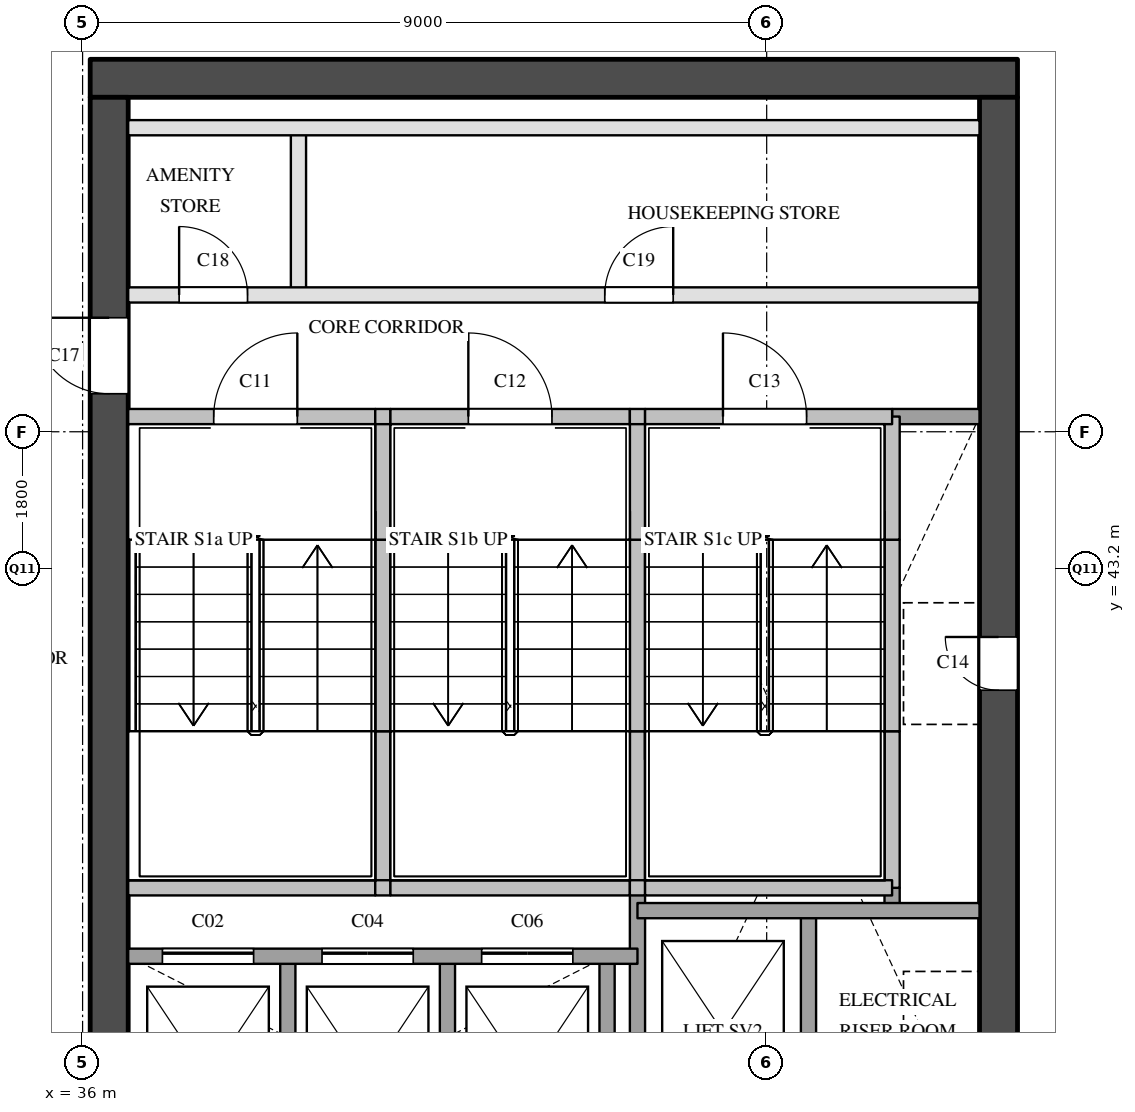
"""IFC4 building model, lengths in metres.
Left out: names, types, materials, properties, quantities, classifications, styles, units other than length and angle.
Written with IfcOpenShell. Run it as: python <this file> out.ifc"""

import sys

from ifc_helpers import new_model, si_unit, direction, frame, frame_2d, origin, place, context, subcontext, project, spatial, rectangle, extrude, element, fill, save


model = new_model("IFC4")
c1 = context("Model", 3, precision=1e-05, world=origin(), true_north=direction((0.0, 1.0)))
c2 = subcontext(c1, "Body", "Model", "MODEL_VIEW")
j1 = project(units=[si_unit("LENGTHUNIT", "METRE"), si_unit("PLANEANGLEUNIT", "RADIAN")], contexts=[c1])
p1 = place(None, origin())
s1 = spatial("IfcSite", under=j1, at=p1, CompositionType="ELEMENT")
p2 = place(p1, origin())
s2 = spatial("IfcBuilding", under=s1, at=p2, CompositionType="ELEMENT")
p3 = place(p2, frame((0.0, 0.0, 129.4)))
s3 = spatial("IfcBuildingStorey", under=s2, at=p3, CompositionType="ELEMENT", Elevation=129.4)
p4 = place(p3, frame((36.1, 49.65, 0.0), z_axis=(0.0, 0.0, 1.0), x_axis=(1.0, 0.0, 0.0)))
e1 = element("IfcWall", 1, at=p4, inside=s3, PredefinedType="SHEAR", context=c2, shape_type="SweptSolid", body=[
    extrude(rectangle(XDim=12.2, YDim=0.5, at=frame_2d((6.1, 0.0))), origin(), (0.0, 0.0, 1.0), 5.2),
])
p5 = place(p3, frame((36.35, 29.1, 0.0), z_axis=(0.0, 0.0, 1.0), x_axis=(0.0, 1.0, 0.0)))
e2 = element("IfcWall", 2, at=p5, inside=s3, PredefinedType="SHEAR", context=c2, shape_type="SweptSolid", body=[
    extrude(rectangle(XDim=20.3, YDim=0.5, at=frame_2d((10.15, 0.0))), origin(), (0.0, 0.0, 1.0), 5.2),
])
p6 = place(p5, frame((3.6, 0.0, 0.0)))
e3 = element("IfcOpeningElement", 3, at=p6, cuts=e2, PredefinedType="OPENING", context=c2, shape_type="SweptSolid", body=[
    extrude(rectangle(XDim=1.8, YDim=2.1, at=frame_2d((0.9, 1.05))), frame((0.0, 0.26, 0.0), z_axis=(0.0, -1.0, 0.0), x_axis=(1.0, 0.0, 0.0)), (0.0, 0.0, 1.0), 0.52),
])
p7 = place(p5, frame((16.4, 0.0, 0.0)))
e4 = element("IfcOpeningElement", 4, at=p7, cuts=e2, PredefinedType="OPENING", context=c2, shape_type="SweptSolid", body=[
    extrude(rectangle(XDim=1.0, YDim=2.1, at=frame_2d((0.5, 1.05))), frame((0.0, 0.26, 0.0), z_axis=(0.0, -1.0, 0.0), x_axis=(1.0, 0.0, 0.0)), (0.0, 0.0, 1.0), 0.52),
])
p8 = place(p3, frame((48.05, 29.1, 0.0), z_axis=(0.0, 0.0, 1.0), x_axis=(0.0, 1.0, 0.0)))
e5 = element("IfcWall", 5, at=p8, inside=s3, PredefinedType="SHEAR", context=c2, shape_type="SweptSolid", body=[
    extrude(rectangle(XDim=20.3, YDim=0.5, at=frame_2d((10.15, 0.0))), origin(), (0.0, 0.0, 1.0), 5.2),
])
p9 = place(p8, frame((12.5, 0.0, 0.0)))
e6 = element("IfcOpeningElement", 6, at=p9, cuts=e5, PredefinedType="OPENING", context=c2, shape_type="SweptSolid", body=[
    extrude(rectangle(XDim=0.7, YDim=2.1, at=frame_2d((0.35, 1.05))), frame((0.0, 0.26, 0.0), z_axis=(0.0, -1.0, 0.0), x_axis=(1.0, 0.0, 0.0)), (0.0, 0.0, 1.0), 0.52),
])
p10 = place(p8, frame((3.9, 0.0, 0.0)))
e7 = element("IfcOpeningElement", 7, at=p10, cuts=e5, PredefinedType="OPENING", context=c2, shape_type="SweptSolid", body=[
    extrude(rectangle(XDim=1.8, YDim=2.1, at=frame_2d((0.9, 1.05))), frame((0.0, 0.26, 0.0), z_axis=(0.0, -1.0, 0.0), x_axis=(1.0, 0.0, 0.0)), (0.0, 0.0, 1.0), 0.52),
])
p11 = place(p3, frame((38.7, 34.9, 0.0), z_axis=(0.0, 0.0, 1.0), x_axis=(0.0, 1.0, 0.0)))
e8 = element("IfcWall", 8, at=p11, inside=s3, PredefinedType="SOLIDWALL", context=c2, shape_type="SweptSolid", body=[
    extrude(rectangle(XDim=3.2, YDim=0.2, at=frame_2d((1.6, 0.0))), origin(), (0.0, 0.0, 1.0), 5.2),
])
p12 = place(p3, frame((38.84, 46.8, 0.0), z_axis=(0.0, 0.0, 1.0), x_axis=(0.0, 1.0, 0.0)))
e9 = element("IfcWall", 9, at=p12, inside=s3, PredefinedType="PARTITIONING", context=c2, shape_type="SweptSolid", body=[
    extrude(rectangle(XDim=2.2, YDim=0.2, at=frame_2d((1.1, 0.0))), origin(), (0.0, 0.0, 1.0), 5.2),
])
p13 = place(p3, frame((39.95, 39.0, 0.0), z_axis=(0.0, 0.0, 1.0), x_axis=(0.0, 1.0, 0.0)))
e10 = element("IfcWall", 10, at=p13, inside=s3, PredefinedType="SOLIDWALL", context=c2, shape_type="SweptSolid", body=[
    extrude(rectangle(XDim=2.06, YDim=0.2, at=frame_2d((1.03, 0.0))), origin(), (0.0, 0.0, 1.0), 5.2),
])
p14 = place(p3, frame((39.95, 41.06, 0.0), z_axis=(0.0, 0.0, 1.0), x_axis=(0.0, 1.0, 0.0)))
e11 = element("IfcWall", 11, at=p14, inside=s3, PredefinedType="SOLIDWALL", context=c2, shape_type="SweptSolid", body=[
    extrude(rectangle(XDim=2.52, YDim=0.2, at=frame_2d((1.26, 0.0))), origin(), (0.0, 0.0, 1.0), 5.2),
])
p15 = place(p3, frame((39.95, 43.58, 0.0), z_axis=(0.0, 0.0, 1.0), x_axis=(0.0, 1.0, 0.0)))
e12 = element("IfcWall", 12, at=p15, inside=s3, PredefinedType="SOLIDWALL", context=c2, shape_type="SweptSolid", body=[
    extrude(rectangle(XDim=1.62, YDim=0.2, at=frame_2d((0.81, 0.0))), origin(), (0.0, 0.0, 1.0), 5.2),
])
for number, where, z_axis, x_axis in (
    (13, (40.8, 34.9, 0.0), (0.0, 0.0, 1.0), (0.0, 1.0, 0.0)),
    (14, (42.9, 34.9, 0.0), (0.0, 0.0, 1.0), (0.0, 1.0, 0.0)),
):
    element("IfcWall", number, at=place(p3, frame(where, z_axis=z_axis, x_axis=x_axis)), inside=s3, PredefinedType="SOLIDWALL", context=c2, shape_type="SweptSolid", body=[
        extrude(rectangle(XDim=3.2, YDim=0.2, at=frame_2d((1.6, 0.0))), origin(), (0.0, 0.0, 1.0), 5.2),
    ])
p16 = place(p3, frame((43.3, 29.1, 0.0), z_axis=(0.0, 0.0, 1.0), x_axis=(0.0, 1.0, 0.0)))
e15 = element("IfcWall", 15, at=p16, inside=s3, PredefinedType="SOLIDWALL", context=c2, shape_type="SweptSolid", body=[
    extrude(rectangle(XDim=9.9, YDim=0.2, at=frame_2d((4.95, 0.0))), origin(), (0.0, 0.0, 1.0), 5.2),
])
p17 = place(p3, frame((43.3, 39.0, 0.0), z_axis=(0.0, 0.0, 1.0), x_axis=(0.0, 1.0, 0.0)))
e16 = element("IfcWall", 16, at=p17, inside=s3, PredefinedType="SOLIDWALL", context=c2, shape_type="SweptSolid", body=[
    extrude(rectangle(XDim=2.06, YDim=0.2, at=frame_2d((1.03, 0.0))), origin(), (0.0, 0.0, 1.0), 5.2),
])
p18 = place(p3, frame((43.3, 41.06, 0.0), z_axis=(0.0, 0.0, 1.0), x_axis=(0.0, 1.0, 0.0)))
e17 = element("IfcWall", 17, at=p18, inside=s3, PredefinedType="SOLIDWALL", context=c2, shape_type="SweptSolid", body=[
    extrude(rectangle(XDim=2.52, YDim=0.2, at=frame_2d((1.26, 0.0))), origin(), (0.0, 0.0, 1.0), 5.2),
])
p19 = place(p3, frame((43.3, 43.58, 0.0), z_axis=(0.0, 0.0, 1.0), x_axis=(0.0, 1.0, 0.0)))
e18 = element("IfcWall", 18, at=p19, inside=s3, PredefinedType="SOLIDWALL", context=c2, shape_type="SweptSolid", body=[
    extrude(rectangle(XDim=1.62, YDim=0.2, at=frame_2d((0.81, 0.0))), origin(), (0.0, 0.0, 1.0), 5.2),
])
p20 = place(p3, frame((45.55, 35.5, 0.0), z_axis=(0.0, 0.0, 1.0), x_axis=(0.0, 1.0, 0.0)))
e19 = element("IfcWall", 19, at=p20, inside=s3, PredefinedType="SOLIDWALL", context=c2, shape_type="SweptSolid", body=[
    extrude(rectangle(XDim=3.2, YDim=0.2, at=frame_2d((1.6, 0.0))), origin(), (0.0, 0.0, 1.0), 5.2),
])
p21 = place(p3, frame((46.65, 38.7, 0.0), z_axis=(0.0, 0.0, 1.0), x_axis=(0.0, 1.0, 0.0)))
e20 = element("IfcWall", 20, at=p21, inside=s3, PredefinedType="SOLIDWALL", context=c2, shape_type="SweptSolid", body=[
    extrude(rectangle(XDim=0.3, YDim=0.2, at=frame_2d((0.15, 0.0))), origin(), (0.0, 0.0, 1.0), 5.2),
])
p22 = place(p3, frame((46.65, 39.0, 0.0), z_axis=(0.0, 0.0, 1.0), x_axis=(0.0, 1.0, 0.0)))
e21 = element("IfcWall", 21, at=p22, inside=s3, PredefinedType="SOLIDWALL", context=c2, shape_type="SweptSolid", body=[
    extrude(rectangle(XDim=2.06, YDim=0.2, at=frame_2d((1.03, 0.0))), origin(), (0.0, 0.0, 1.0), 5.2),
])
p23 = place(p3, frame((46.65, 41.06, 0.0), z_axis=(0.0, 0.0, 1.0), x_axis=(0.0, 1.0, 0.0)))
e22 = element("IfcWall", 22, at=p23, inside=s3, PredefinedType="SOLIDWALL", context=c2, shape_type="SweptSolid", body=[
    extrude(rectangle(XDim=2.52, YDim=0.2, at=frame_2d((1.26, 0.0))), origin(), (0.0, 0.0, 1.0), 5.2),
])
p24 = place(p3, frame((46.65, 43.58, 0.0), z_axis=(0.0, 0.0, 1.0), x_axis=(0.0, 1.0, 0.0)))
e23 = element("IfcWall", 23, at=p24, inside=s3, PredefinedType="SOLIDWALL", context=c2, shape_type="SweptSolid", body=[
    extrude(rectangle(XDim=1.62, YDim=0.2, at=frame_2d((0.81, 0.0))), origin(), (0.0, 0.0, 1.0), 5.2),
])
p25 = place(p3, frame((36.6, 38.1, 0.0), z_axis=(0.0, 0.0, 1.0), x_axis=(1.0, 0.0, 0.0)))
e24 = element("IfcWall", 24, at=p25, inside=s3, PredefinedType="SOLIDWALL", context=c2, shape_type="SweptSolid", body=[
    extrude(rectangle(XDim=6.7, YDim=0.2, at=frame_2d((3.35, 0.0))), origin(), (0.0, 0.0, 1.0), 5.2),
])
p26 = place(p25, frame((0.45, 0.0, 0.0)))
e25 = element("IfcOpeningElement", 25, at=p26, cuts=e24, PredefinedType="OPENING", context=c2, shape_type="SweptSolid", body=[
    extrude(rectangle(XDim=1.2, YDim=2.1, at=frame_2d((0.6, 1.05))), frame((0.0, 0.11, 0.0), z_axis=(0.0, -1.0, 0.0), x_axis=(1.0, 0.0, 0.0)), (0.0, 0.0, 1.0), 0.22),
])
p27 = place(p25, frame((2.55, 0.0, 0.0)))
e26 = element("IfcOpeningElement", 26, at=p27, cuts=e24, PredefinedType="OPENING", context=c2, shape_type="SweptSolid", body=[
    extrude(rectangle(XDim=1.2, YDim=2.1, at=frame_2d((0.6, 1.05))), frame((0.0, 0.11, 0.0), z_axis=(0.0, -1.0, 0.0), x_axis=(1.0, 0.0, 0.0)), (0.0, 0.0, 1.0), 0.22),
])
p28 = place(p25, frame((4.65, 0.0, 0.0)))
e27 = element("IfcOpeningElement", 27, at=p28, cuts=e24, PredefinedType="OPENING", context=c2, shape_type="SweptSolid", body=[
    extrude(rectangle(XDim=1.2, YDim=2.1, at=frame_2d((0.6, 1.05))), frame((0.0, 0.11, 0.0), z_axis=(0.0, -1.0, 0.0), x_axis=(1.0, 0.0, 0.0)), (0.0, 0.0, 1.0), 0.22),
])
p29 = place(p3, frame((43.3, 38.7, 0.0), z_axis=(0.0, 0.0, 1.0), x_axis=(1.0, 0.0, 0.0)))
e28 = element("IfcWall", 28, at=p29, inside=s3, PredefinedType="SOLIDWALL", context=c2, shape_type="SweptSolid", body=[
    extrude(rectangle(XDim=4.5, YDim=0.2, at=frame_2d((2.25, 0.0))), origin(), (0.0, 0.0, 1.0), 5.2),
])
p30 = place(p3, frame((36.6, 39.0, 0.0), z_axis=(0.0, 0.0, 1.0), x_axis=(1.0, 0.0, 0.0)))
e29 = element("IfcWall", 29, at=p30, inside=s3, PredefinedType="SOLIDWALL", context=c2, shape_type="SweptSolid", body=[
    extrude(rectangle(XDim=3.25, YDim=0.2, at=frame_2d((1.625, 0.0))), origin(), (0.0, 0.0, 1.0), 5.2),
])
p31 = place(p3, frame((39.85, 39.0, 0.0), z_axis=(0.0, 0.0, 1.0), x_axis=(1.0, 0.0, 0.0)))
e30 = element("IfcWall", 30, at=p31, inside=s3, PredefinedType="SOLIDWALL", context=c2, shape_type="SweptSolid", body=[
    extrude(rectangle(XDim=0.2, YDim=0.2, at=frame_2d((0.1, 0.0))), origin(), (0.0, 0.0, 1.0), 5.2),
])
p32 = place(p3, frame((40.05, 39.0, 0.0), z_axis=(0.0, 0.0, 1.0), x_axis=(1.0, 0.0, 0.0)))
e31 = element("IfcWall", 31, at=p32, inside=s3, PredefinedType="SOLIDWALL", context=c2, shape_type="SweptSolid", body=[
    extrude(rectangle(XDim=3.15, YDim=0.2, at=frame_2d((1.575, 0.0))), origin(), (0.0, 0.0, 1.0), 5.2),
])
p33 = place(p3, frame((43.2, 39.0, 0.0), z_axis=(0.0, 0.0, 1.0), x_axis=(1.0, 0.0, 0.0)))
e32 = element("IfcWall", 32, at=p33, inside=s3, PredefinedType="SOLIDWALL", context=c2, shape_type="SweptSolid", body=[
    extrude(rectangle(XDim=0.2, YDim=0.2, at=frame_2d((0.1, 0.0))), origin(), (0.0, 0.0, 1.0), 5.2),
])
p34 = place(p3, frame((43.4, 39.0, 0.0), z_axis=(0.0, 0.0, 1.0), x_axis=(1.0, 0.0, 0.0)))
e33 = element("IfcWall", 33, at=p34, inside=s3, PredefinedType="SOLIDWALL", context=c2, shape_type="SweptSolid", body=[
    extrude(rectangle(XDim=3.25, YDim=0.2, at=frame_2d((1.625, 0.0))), origin(), (0.0, 0.0, 1.0), 5.2),
])
p35 = place(p3, frame((46.65, 45.2, 0.0), z_axis=(0.0, 0.0, 1.0), x_axis=(1.0, 0.0, 0.0)))
e34 = element("IfcWall", 34, at=p35, inside=s3, PredefinedType="SOLIDWALL", context=c2, shape_type="SweptSolid", body=[
    extrude(rectangle(XDim=1.15, YDim=0.2, at=frame_2d((0.575, 0.0))), origin(), (0.0, 0.0, 1.0), 5.2),
])
p36 = place(p3, frame((36.6, 45.2, 0.0), z_axis=(0.0, 0.0, 1.0), x_axis=(1.0, 0.0, 0.0)))
e35 = element("IfcWall", 35, at=p36, inside=s3, PredefinedType="SOLIDWALL", context=c2, shape_type="SweptSolid", body=[
    extrude(rectangle(XDim=3.25, YDim=0.2, at=frame_2d((1.625, 0.0))), origin(), (0.0, 0.0, 1.0), 5.2),
])
p37 = place(p36, frame((1.125, 0.0, 0.0)))
e36 = element("IfcOpeningElement", 36, at=p37, cuts=e35, PredefinedType="OPENING", context=c2, shape_type="SweptSolid", body=[
    extrude(rectangle(XDim=1.1, YDim=2.1, at=frame_2d((0.55, 1.05))), frame((0.0, 0.11, 0.0), z_axis=(0.0, -1.0, 0.0), x_axis=(1.0, 0.0, 0.0)), (0.0, 0.0, 1.0), 0.22),
])
p38 = place(p3, frame((39.85, 45.2, 0.0), z_axis=(0.0, 0.0, 1.0), x_axis=(1.0, 0.0, 0.0)))
e37 = element("IfcWall", 37, at=p38, inside=s3, PredefinedType="SOLIDWALL", context=c2, shape_type="SweptSolid", body=[
    extrude(rectangle(XDim=0.2, YDim=0.2, at=frame_2d((0.1, 0.0))), origin(), (0.0, 0.0, 1.0), 5.2),
])
p39 = place(p3, frame((40.05, 45.2, 0.0), z_axis=(0.0, 0.0, 1.0), x_axis=(1.0, 0.0, 0.0)))
e38 = element("IfcWall", 38, at=p39, inside=s3, PredefinedType="SOLIDWALL", context=c2, shape_type="SweptSolid", body=[
    extrude(rectangle(XDim=3.15, YDim=0.2, at=frame_2d((1.575, 0.0))), origin(), (0.0, 0.0, 1.0), 5.2),
])
p40 = place(p39, frame((1.025, 0.0, 0.0)))
e39 = element("IfcOpeningElement", 39, at=p40, cuts=e38, PredefinedType="OPENING", context=c2, shape_type="SweptSolid", body=[
    extrude(rectangle(XDim=1.1, YDim=2.1, at=frame_2d((0.55, 1.05))), frame((0.0, 0.11, 0.0), z_axis=(0.0, -1.0, 0.0), x_axis=(1.0, 0.0, 0.0)), (0.0, 0.0, 1.0), 0.22),
])
p41 = place(p3, frame((43.2, 45.2, 0.0), z_axis=(0.0, 0.0, 1.0), x_axis=(1.0, 0.0, 0.0)))
e40 = element("IfcWall", 40, at=p41, inside=s3, PredefinedType="SOLIDWALL", context=c2, shape_type="SweptSolid", body=[
    extrude(rectangle(XDim=0.2, YDim=0.2, at=frame_2d((0.1, 0.0))), origin(), (0.0, 0.0, 1.0), 5.2),
])
p42 = place(p3, frame((43.4, 45.2, 0.0), z_axis=(0.0, 0.0, 1.0), x_axis=(1.0, 0.0, 0.0)))
e41 = element("IfcWall", 41, at=p42, inside=s3, PredefinedType="SOLIDWALL", context=c2, shape_type="SweptSolid", body=[
    extrude(rectangle(XDim=3.25, YDim=0.2, at=frame_2d((1.625, 0.0))), origin(), (0.0, 0.0, 1.0), 5.2),
])
p43 = place(p42, frame((1.025, 0.0, 0.0)))
e42 = element("IfcOpeningElement", 42, at=p43, cuts=e41, PredefinedType="OPENING", context=c2, shape_type="SweptSolid", body=[
    extrude(rectangle(XDim=1.1, YDim=2.1, at=frame_2d((0.55, 1.05))), frame((0.0, 0.11, 0.0), z_axis=(0.0, -1.0, 0.0), x_axis=(1.0, 0.0, 0.0)), (0.0, 0.0, 1.0), 0.22),
])
p44 = place(p3, frame((36.6, 46.8, 0.0), z_axis=(0.0, 0.0, 1.0), x_axis=(1.0, 0.0, 0.0)))
e43 = element("IfcWall", 43, at=p44, inside=s3, PredefinedType="PARTITIONING", context=c2, shape_type="SweptSolid", body=[
    extrude(rectangle(XDim=11.2, YDim=0.2, at=frame_2d((5.6, 0.0))), origin(), (0.0, 0.0, 1.0), 5.2),
])
p45 = place(p44, frame((0.67, 0.0, 0.0)))
e44 = element("IfcOpeningElement", 44, at=p45, cuts=e43, PredefinedType="OPENING", context=c2, shape_type="SweptSolid", body=[
    extrude(rectangle(XDim=0.9, YDim=2.1, at=frame_2d((0.45, 1.05))), frame((0.0, 0.11, 0.0), z_axis=(0.0, -1.0, 0.0), x_axis=(1.0, 0.0, 0.0)), (0.0, 0.0, 1.0), 0.22),
])
p46 = place(p44, frame((6.27, 0.0, 0.0)))
e45 = element("IfcOpeningElement", 45, at=p46, cuts=e43, PredefinedType="OPENING", context=c2, shape_type="SweptSolid", body=[
    extrude(rectangle(XDim=0.9, YDim=2.1, at=frame_2d((0.45, 1.05))), frame((0.0, 0.11, 0.0), z_axis=(0.0, -1.0, 0.0), x_axis=(1.0, 0.0, 0.0)), (0.0, 0.0, 1.0), 0.22),
])
p47 = place(p3, frame((36.6, 49.0, 0.0), z_axis=(0.0, 0.0, 1.0), x_axis=(1.0, 0.0, 0.0)))
e46 = element("IfcWall", 46, at=p47, inside=s3, PredefinedType="PARTITIONING", context=c2, shape_type="SweptSolid", body=[
    extrude(rectangle(XDim=11.2, YDim=0.2, at=frame_2d((5.6, 0.0))), origin(), (0.0, 0.0, 1.0), 5.2),
])
p48 = place(p26, origin())
e47 = element("IfcDoor", 47, at=p48, inside=s3, OperationType="SLIDING_TO_LEFT", PredefinedType="DOOR", context=c2, shape_type="SweptSolid", body=[
    extrude(rectangle(XDim=1.2, YDim=2.1, at=frame_2d((0.6, 1.05))), frame((0.0, 0.025, 0.0), z_axis=(0.0, -1.0, 0.0), x_axis=(1.0, 0.0, 0.0)), (0.0, 0.0, 1.0), 0.05),
])
fill(e25, e47)
p49 = place(p27, origin())
e48 = element("IfcDoor", 48, at=p49, inside=s3, OperationType="SLIDING_TO_LEFT", PredefinedType="DOOR", context=c2, shape_type="SweptSolid", body=[
    extrude(rectangle(XDim=1.2, YDim=2.1, at=frame_2d((0.6, 1.05))), frame((0.0, 0.025, 0.0), z_axis=(0.0, -1.0, 0.0), x_axis=(1.0, 0.0, 0.0)), (0.0, 0.0, 1.0), 0.05),
])
fill(e26, e48)
p50 = place(p28, origin())
e49 = element("IfcDoor", 49, at=p50, inside=s3, OperationType="SLIDING_TO_LEFT", PredefinedType="DOOR", context=c2, shape_type="SweptSolid", body=[
    extrude(rectangle(XDim=1.2, YDim=2.1, at=frame_2d((0.6, 1.05))), frame((0.0, 0.025, 0.0), z_axis=(0.0, -1.0, 0.0), x_axis=(1.0, 0.0, 0.0)), (0.0, 0.0, 1.0), 0.05),
])
fill(e27, e49)
p51 = place(p37, origin())
e50 = element("IfcDoor", 50, at=p51, inside=s3, OperationType="SINGLE_SWING_RIGHT", PredefinedType="DOOR", context=c2, shape_type="SweptSolid", body=[
    extrude(rectangle(XDim=1.1, YDim=2.1, at=frame_2d((0.55, 1.05))), frame((0.0, 0.025, 0.0), z_axis=(0.0, -1.0, 0.0), x_axis=(1.0, 0.0, 0.0)), (0.0, 0.0, 1.0), 0.05),
])
fill(e36, e50)
p52 = place(p40, origin())
e51 = element("IfcDoor", 51, at=p52, inside=s3, OperationType="SINGLE_SWING_LEFT", PredefinedType="DOOR", context=c2, shape_type="SweptSolid", body=[
    extrude(rectangle(XDim=1.1, YDim=2.1, at=frame_2d((0.55, 1.05))), frame((0.0, 0.025, 0.0), z_axis=(0.0, -1.0, 0.0), x_axis=(1.0, 0.0, 0.0)), (0.0, 0.0, 1.0), 0.05),
])
fill(e39, e51)
p53 = place(p43, origin())
e52 = element("IfcDoor", 52, at=p53, inside=s3, OperationType="SINGLE_SWING_LEFT", PredefinedType="DOOR", context=c2, shape_type="SweptSolid", body=[
    extrude(rectangle(XDim=1.1, YDim=2.1, at=frame_2d((0.55, 1.05))), frame((0.0, 0.025, 0.0), z_axis=(0.0, -1.0, 0.0), x_axis=(1.0, 0.0, 0.0)), (0.0, 0.0, 1.0), 0.05),
])
fill(e42, e52)
p54 = place(p9, origin())
e53 = element("IfcDoor", 53, at=p54, inside=s3, OperationType="SINGLE_SWING_RIGHT", PredefinedType="DOOR", context=c2, shape_type="SweptSolid", body=[
    extrude(rectangle(XDim=0.7, YDim=2.1, at=frame_2d((0.35, 1.05))), frame((0.0, 0.025, 0.0), z_axis=(0.0, -1.0, 0.0), x_axis=(1.0, 0.0, 0.0)), (0.0, 0.0, 1.0), 0.05),
])
fill(e6, e53)
p55 = place(p7, origin())
e54 = element("IfcDoor", 54, at=p55, inside=s3, OperationType="SINGLE_SWING_RIGHT", PredefinedType="DOOR", context=c2, shape_type="SweptSolid", body=[
    extrude(rectangle(XDim=1.0, YDim=2.1, at=frame_2d((0.5, 1.05))), frame((0.0, 0.025, 0.0), z_axis=(0.0, -1.0, 0.0), x_axis=(1.0, 0.0, 0.0)), (0.0, 0.0, 1.0), 0.05),
])
fill(e4, e54)
p56 = place(p45, origin())
e55 = element("IfcDoor", 55, at=p56, inside=s3, OperationType="SINGLE_SWING_LEFT", PredefinedType="DOOR", context=c2, shape_type="SweptSolid", body=[
    extrude(rectangle(XDim=0.9, YDim=2.1, at=frame_2d((0.45, 1.05))), frame((0.0, 0.025, 0.0), z_axis=(0.0, -1.0, 0.0), x_axis=(1.0, 0.0, 0.0)), (0.0, 0.0, 1.0), 0.05),
])
fill(e44, e55)
p57 = place(p46, origin())
e56 = element("IfcDoor", 56, at=p57, inside=s3, OperationType="SINGLE_SWING_RIGHT", PredefinedType="DOOR", context=c2, shape_type="SweptSolid", body=[
    extrude(rectangle(XDim=0.9, YDim=2.1, at=frame_2d((0.45, 1.05))), frame((0.0, 0.025, 0.0), z_axis=(0.0, -1.0, 0.0), x_axis=(1.0, 0.0, 0.0)), (0.0, 0.0, 1.0), 0.05),
])
fill(e45, e56)
save(model, sys.argv[1])
